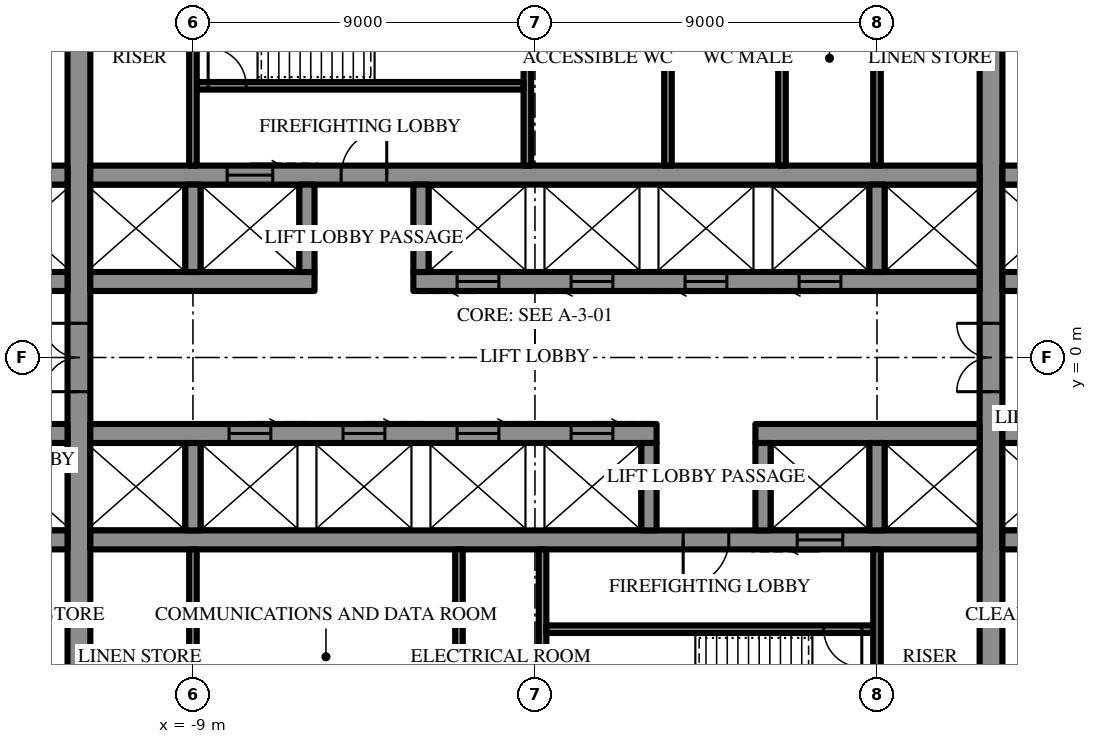
"""IFC4 building model, lengths in metres.
Left out: names, types, materials, properties, quantities, classifications, styles, units other than length and angle.
Written with IfcOpenShell. Run it as: python <this file> out.ifc"""

import sys

from ifc_helpers import new_model, si_unit, direction, frame, frame_2d, origin, place, context, subcontext, project, spatial, rectangle, extrude, element, fill, save


model = new_model("IFC4")
c1 = context("Model", 3, precision=1e-05, world=origin(), true_north=direction((0.0, 1.0)))
c2 = subcontext(c1, "Body", "Model", "MODEL_VIEW")
j1 = project(units=[si_unit("LENGTHUNIT", "METRE"), si_unit("PLANEANGLEUNIT", "RADIAN")], contexts=[c1])
p1 = place(None, origin())
s1 = spatial("IfcSite", under=j1, at=p1, CompositionType="ELEMENT")
p2 = place(p1, origin())
s2 = spatial("IfcBuilding", under=s1, at=p2, CompositionType="ELEMENT")
p3 = place(p2, frame((0.0, 0.0, 86.5)))
s3 = spatial("IfcBuildingStorey", under=s2, at=p3, CompositionType="ELEMENT", Elevation=86.5)
p4 = place(p3, frame((12.0, -10.7, 0.0), z_axis=(0.0, 0.0, 1.0), x_axis=(0.0, 1.0, 0.0)))
e1 = element("IfcWall", 1, at=p4, inside=s3, PredefinedType="SHEAR", context=c2, shape_type="SweptSolid", body=[
    extrude(rectangle(XDim=21.4, YDim=0.6, at=frame_2d((10.7, 0.0))), origin(), (0.0, 0.0, 1.0), 4.2),
])
p5 = place(p4, frame((9.8, 0.0, 0.0)))
e2 = element("IfcOpeningElement", 2, at=p5, cuts=e1, PredefinedType="OPENING", context=c2, shape_type="SweptSolid", body=[
    extrude(rectangle(XDim=1.8, YDim=2.4, at=frame_2d((0.9, 1.2))), frame((0.0, 0.31, 0.0), z_axis=(0.0, -1.0, 0.0), x_axis=(1.0, 0.0, 0.0)), (0.0, 0.0, 1.0), 0.62),
])
p6 = place(p3, frame((-12.0, -10.7, 0.0), z_axis=(0.0, 0.0, 1.0), x_axis=(0.0, 1.0, 0.0)))
e3 = element("IfcWall", 3, at=p6, inside=s3, PredefinedType="SHEAR", context=c2, shape_type="SweptSolid", body=[
    extrude(rectangle(XDim=21.4, YDim=0.6, at=frame_2d((10.7, 0.0))), origin(), (0.0, 0.0, 1.0), 4.2),
])
p7 = place(p6, frame((9.8, 0.0, 0.0)))
e4 = element("IfcOpeningElement", 4, at=p7, cuts=e3, PredefinedType="OPENING", context=c2, shape_type="SweptSolid", body=[
    extrude(rectangle(XDim=1.8, YDim=2.4, at=frame_2d((0.9, 1.2))), frame((0.0, 0.31, 0.0), z_axis=(0.0, -1.0, 0.0), x_axis=(1.0, 0.0, 0.0)), (0.0, 0.0, 1.0), 0.62),
])
p8 = place(p3, frame((-14.8, 2.0, 0.0), z_axis=(0.0, 0.0, 1.0), x_axis=(1.0, 0.0, 0.0)))
e5 = element("IfcWall", 5, at=p8, inside=s3, PredefinedType="SHEAR", context=c2, shape_type="SweptSolid", body=[
    extrude(rectangle(XDim=2.5, YDim=0.5, at=frame_2d((1.25, 0.0))), origin(), (0.0, 0.0, 1.0), 4.2),
])
p9 = place(p3, frame((-11.7, 2.0, 0.0), z_axis=(0.0, 0.0, 1.0), x_axis=(1.0, 0.0, 0.0)))
e6 = element("IfcWall", 6, at=p9, inside=s3, PredefinedType="SHEAR", context=c2, shape_type="SweptSolid", body=[
    extrude(rectangle(XDim=5.9, YDim=0.5, at=frame_2d((2.95, 0.0))), origin(), (0.0, 0.0, 1.0), 4.2),
])
p10 = place(p3, frame((-3.2, 2.0, 0.0), z_axis=(0.0, 0.0, 1.0), x_axis=(1.0, 0.0, 0.0)))
e7 = element("IfcWall", 7, at=p10, inside=s3, PredefinedType="SHEAR", context=c2, shape_type="SweptSolid", body=[
    extrude(rectangle(XDim=14.9, YDim=0.5, at=frame_2d((7.45, 0.0))), origin(), (0.0, 0.0, 1.0), 4.2),
])
p11 = place(p10, frame((1.15, 0.0, 0.0)))
e8 = element("IfcOpeningElement", 8, at=p11, cuts=e7, PredefinedType="OPENING", context=c2, shape_type="SweptSolid", body=[
    extrude(rectangle(XDim=1.1, YDim=2.2, at=frame_2d((0.55, 1.1))), frame((0.0, 0.26, 0.0), z_axis=(0.0, -1.0, 0.0), x_axis=(1.0, 0.0, 0.0)), (0.0, 0.0, 1.0), 0.52),
])
p12 = place(p10, frame((4.15, 0.0, 0.0)))
e9 = element("IfcOpeningElement", 9, at=p12, cuts=e7, PredefinedType="OPENING", context=c2, shape_type="SweptSolid", body=[
    extrude(rectangle(XDim=1.1, YDim=2.2, at=frame_2d((0.55, 1.1))), frame((0.0, 0.26, 0.0), z_axis=(0.0, -1.0, 0.0), x_axis=(1.0, 0.0, 0.0)), (0.0, 0.0, 1.0), 0.52),
])
p13 = place(p10, frame((7.15, 0.0, 0.0)))
e10 = element("IfcOpeningElement", 10, at=p13, cuts=e7, PredefinedType="OPENING", context=c2, shape_type="SweptSolid", body=[
    extrude(rectangle(XDim=1.1, YDim=2.2, at=frame_2d((0.55, 1.1))), frame((0.0, 0.26, 0.0), z_axis=(0.0, -1.0, 0.0), x_axis=(1.0, 0.0, 0.0)), (0.0, 0.0, 1.0), 0.52),
])
p14 = place(p10, frame((10.15, 0.0, 0.0)))
e11 = element("IfcOpeningElement", 11, at=p14, cuts=e7, PredefinedType="OPENING", context=c2, shape_type="SweptSolid", body=[
    extrude(rectangle(XDim=1.1, YDim=2.2, at=frame_2d((0.55, 1.1))), frame((0.0, 0.26, 0.0), z_axis=(0.0, -1.0, 0.0), x_axis=(1.0, 0.0, 0.0)), (0.0, 0.0, 1.0), 0.52),
])
for number, where, z_axis, x_axis in (
    (12, (12.3, 2.0, 0.0), (0.0, 0.0, 1.0), (1.0, 0.0, 0.0)),
    (13, (-14.8, 4.8, 0.0), (0.0, 0.0, 1.0), (1.0, 0.0, 0.0)),
):
    element("IfcWall", number, at=place(p3, frame(where, z_axis=z_axis, x_axis=x_axis)), inside=s3, PredefinedType="SHEAR", context=c2, shape_type="SweptSolid", body=[
        extrude(rectangle(XDim=2.5, YDim=0.5, at=frame_2d((1.25, 0.0))), origin(), (0.0, 0.0, 1.0), 4.2),
    ])
p15 = place(p3, frame((-11.7, 4.8, 0.0), z_axis=(0.0, 0.0, 1.0), x_axis=(1.0, 0.0, 0.0)))
e14 = element("IfcWall", 14, at=p15, inside=s3, PredefinedType="SHEAR", context=c2, shape_type="SweptSolid", body=[
    extrude(rectangle(XDim=23.4, YDim=0.5, at=frame_2d((11.7, 0.0))), origin(), (0.0, 0.0, 1.0), 4.2),
])
p16 = place(p15, frame((6.6, 0.0, 0.0)))
e15 = element("IfcOpeningElement", 15, at=p16, cuts=e14, PredefinedType="OPENING", context=c2, shape_type="SweptSolid", body=[
    extrude(rectangle(XDim=1.2, YDim=2.2, at=frame_2d((0.6, 1.1))), frame((0.0, 0.26, 0.0), z_axis=(0.0, -1.0, 0.0), x_axis=(1.0, 0.0, 0.0)), (0.0, 0.0, 1.0), 0.52),
])
p17 = place(p15, frame((3.6, 0.0, 0.0)))
e16 = element("IfcOpeningElement", 16, at=p17, cuts=e14, PredefinedType="OPENING", context=c2, shape_type="SweptSolid", body=[
    extrude(rectangle(XDim=1.2, YDim=2.2, at=frame_2d((0.6, 1.1))), frame((0.0, 0.26, 0.0), z_axis=(0.0, -1.0, 0.0), x_axis=(1.0, 0.0, 0.0)), (0.0, 0.0, 1.0), 0.52),
])
p18 = place(p3, frame((12.3, 4.8, 0.0), z_axis=(0.0, 0.0, 1.0), x_axis=(1.0, 0.0, 0.0)))
e17 = element("IfcWall", 17, at=p18, inside=s3, PredefinedType="SHEAR", context=c2, shape_type="SweptSolid", body=[
    extrude(rectangle(XDim=2.5, YDim=0.5, at=frame_2d((1.25, 0.0))), origin(), (0.0, 0.0, 1.0), 4.2),
])
for number, where, z_axis, x_axis in (
    (18, (-9.0, 2.25, 0.0), (0.0, 0.0, 1.0), (0.0, 1.0, 0.0)),
    (19, (-6.0, 2.25, 0.0), (0.0, 0.0, 1.0), (0.0, 1.0, 0.0)),
    (20, (-3.0, 2.25, 0.0), (0.0, 0.0, 1.0), (0.0, 1.0, 0.0)),
    (21, (9.0, 2.25, 0.0), (0.0, 0.0, 1.0), (0.0, 1.0, 0.0)),
):
    element("IfcWall", number, at=place(p3, frame(where, z_axis=z_axis, x_axis=x_axis)), inside=s3, PredefinedType="SHEAR", context=c2, shape_type="SweptSolid", body=[
        extrude(rectangle(XDim=2.3, YDim=0.4, at=frame_2d((1.15, 0.0))), origin(), (0.0, 0.0, 1.0), 4.2),
    ])
p19 = place(p3, frame((-0.2, 5.05, 0.0), z_axis=(0.0, 0.0, 1.0), x_axis=(0.0, 1.0, 0.0)))
e22 = element("IfcWall", 22, at=p19, inside=s3, PredefinedType="SHEAR", context=c2, shape_type="SweptSolid", body=[
    extrude(rectangle(XDim=5.65, YDim=0.2, at=frame_2d((2.825, 0.0))), origin(), (0.0, 0.0, 1.0), 4.2),
])
p20 = place(p3, frame((-8.9, 7.15, 0.0), z_axis=(0.0, 0.0, 1.0), x_axis=(1.0, 0.0, 0.0)))
e23 = element("IfcWall", 23, at=p20, inside=s3, PredefinedType="SHEAR", context=c2, shape_type="SweptSolid", body=[
    extrude(rectangle(XDim=8.6, YDim=0.2, at=frame_2d((4.3, 0.0))), origin(), (0.0, 0.0, 1.0), 4.2),
])
p21 = place(p20, frame((0.3, 0.0, 0.0)))
e24 = element("IfcOpeningElement", 24, at=p21, cuts=e23, PredefinedType="OPENING", context=c2, shape_type="SweptSolid", body=[
    extrude(rectangle(XDim=1.0, YDim=2.2, at=frame_2d((0.5, 1.1))), frame((0.0, 0.11, 0.0), z_axis=(0.0, -1.0, 0.0), x_axis=(1.0, 0.0, 0.0)), (0.0, 0.0, 1.0), 0.22),
])
p22 = place(p3, frame((14.8, -2.0, 0.0), z_axis=(0.0, 0.0, 1.0), x_axis=(-1.0, 0.0, 0.0)))
e25 = element("IfcWall", 25, at=p22, inside=s3, PredefinedType="SHEAR", context=c2, shape_type="SweptSolid", body=[
    extrude(rectangle(XDim=2.5, YDim=0.5, at=frame_2d((1.25, 0.0))), origin(), (0.0, 0.0, 1.0), 4.2),
])
p23 = place(p3, frame((11.7, -2.0, 0.0), z_axis=(0.0, 0.0, 1.0), x_axis=(-1.0, 0.0, 0.0)))
e26 = element("IfcWall", 26, at=p23, inside=s3, PredefinedType="SHEAR", context=c2, shape_type="SweptSolid", body=[
    extrude(rectangle(XDim=5.9, YDim=0.5, at=frame_2d((2.95, 0.0))), origin(), (0.0, 0.0, 1.0), 4.2),
])
p24 = place(p3, frame((3.2, -2.0, 0.0), z_axis=(0.0, 0.0, 1.0), x_axis=(-1.0, 0.0, 0.0)))
e27 = element("IfcWall", 27, at=p24, inside=s3, PredefinedType="SHEAR", context=c2, shape_type="SweptSolid", body=[
    extrude(rectangle(XDim=14.9, YDim=0.5, at=frame_2d((7.45, 0.0))), origin(), (0.0, 0.0, 1.0), 4.2),
])
p25 = place(p24, frame((1.15, 0.0, 0.0)))
e28 = element("IfcOpeningElement", 28, at=p25, cuts=e27, PredefinedType="OPENING", context=c2, shape_type="SweptSolid", body=[
    extrude(rectangle(XDim=1.1, YDim=2.2, at=frame_2d((0.55, 1.1))), frame((0.0, 0.26, 0.0), z_axis=(0.0, -1.0, 0.0), x_axis=(1.0, 0.0, 0.0)), (0.0, 0.0, 1.0), 0.52),
])
p26 = place(p24, frame((4.15, 0.0, 0.0)))
e29 = element("IfcOpeningElement", 29, at=p26, cuts=e27, PredefinedType="OPENING", context=c2, shape_type="SweptSolid", body=[
    extrude(rectangle(XDim=1.1, YDim=2.2, at=frame_2d((0.55, 1.1))), frame((0.0, 0.26, 0.0), z_axis=(0.0, -1.0, 0.0), x_axis=(1.0, 0.0, 0.0)), (0.0, 0.0, 1.0), 0.52),
])
p27 = place(p24, frame((7.15, 0.0, 0.0)))
e30 = element("IfcOpeningElement", 30, at=p27, cuts=e27, PredefinedType="OPENING", context=c2, shape_type="SweptSolid", body=[
    extrude(rectangle(XDim=1.1, YDim=2.2, at=frame_2d((0.55, 1.1))), frame((0.0, 0.26, 0.0), z_axis=(0.0, -1.0, 0.0), x_axis=(1.0, 0.0, 0.0)), (0.0, 0.0, 1.0), 0.52),
])
p28 = place(p24, frame((10.15, 0.0, 0.0)))
e31 = element("IfcOpeningElement", 31, at=p28, cuts=e27, PredefinedType="OPENING", context=c2, shape_type="SweptSolid", body=[
    extrude(rectangle(XDim=1.1, YDim=2.2, at=frame_2d((0.55, 1.1))), frame((0.0, 0.26, 0.0), z_axis=(0.0, -1.0, 0.0), x_axis=(1.0, 0.0, 0.0)), (0.0, 0.0, 1.0), 0.52),
])
for number, where, z_axis, x_axis in (
    (32, (-12.3, -2.0, 0.0), (0.0, 0.0, 1.0), (-1.0, 0.0, 0.0)),
    (33, (14.8, -4.8, 0.0), (0.0, 0.0, 1.0), (-1.0, 0.0, 0.0)),
):
    element("IfcWall", number, at=place(p3, frame(where, z_axis=z_axis, x_axis=x_axis)), inside=s3, PredefinedType="SHEAR", context=c2, shape_type="SweptSolid", body=[
        extrude(rectangle(XDim=2.5, YDim=0.5, at=frame_2d((1.25, 0.0))), origin(), (0.0, 0.0, 1.0), 4.2),
    ])
p29 = place(p3, frame((11.7, -4.8, 0.0), z_axis=(0.0, 0.0, 1.0), x_axis=(-1.0, 0.0, 0.0)))
e34 = element("IfcWall", 34, at=p29, inside=s3, PredefinedType="SHEAR", context=c2, shape_type="SweptSolid", body=[
    extrude(rectangle(XDim=23.4, YDim=0.5, at=frame_2d((11.7, 0.0))), origin(), (0.0, 0.0, 1.0), 4.2),
])
p30 = place(p29, frame((6.6, 0.0, 0.0)))
e35 = element("IfcOpeningElement", 35, at=p30, cuts=e34, PredefinedType="OPENING", context=c2, shape_type="SweptSolid", body=[
    extrude(rectangle(XDim=1.2, YDim=2.2, at=frame_2d((0.6, 1.1))), frame((0.0, 0.26, 0.0), z_axis=(0.0, -1.0, 0.0), x_axis=(1.0, 0.0, 0.0)), (0.0, 0.0, 1.0), 0.52),
])
p31 = place(p29, frame((3.6, 0.0, 0.0)))
e36 = element("IfcOpeningElement", 36, at=p31, cuts=e34, PredefinedType="OPENING", context=c2, shape_type="SweptSolid", body=[
    extrude(rectangle(XDim=1.2, YDim=2.2, at=frame_2d((0.6, 1.1))), frame((0.0, 0.26, 0.0), z_axis=(0.0, -1.0, 0.0), x_axis=(1.0, 0.0, 0.0)), (0.0, 0.0, 1.0), 0.52),
])
p32 = place(p3, frame((-12.3, -4.8, 0.0), z_axis=(0.0, 0.0, 1.0), x_axis=(-1.0, 0.0, 0.0)))
e37 = element("IfcWall", 37, at=p32, inside=s3, PredefinedType="SHEAR", context=c2, shape_type="SweptSolid", body=[
    extrude(rectangle(XDim=2.5, YDim=0.5, at=frame_2d((1.25, 0.0))), origin(), (0.0, 0.0, 1.0), 4.2),
])
for number, where, z_axis, x_axis in (
    (38, (9.0, -2.25, 0.0), (0.0, 0.0, 1.0), (0.0, -1.0, 0.0)),
    (39, (6.0, -2.25, 0.0), (0.0, 0.0, 1.0), (0.0, -1.0, 0.0)),
    (40, (3.0, -2.25, 0.0), (0.0, 0.0, 1.0), (0.0, -1.0, 0.0)),
    (41, (-9.0, -2.25, 0.0), (0.0, 0.0, 1.0), (0.0, -1.0, 0.0)),
):
    element("IfcWall", number, at=place(p3, frame(where, z_axis=z_axis, x_axis=x_axis)), inside=s3, PredefinedType="SHEAR", context=c2, shape_type="SweptSolid", body=[
        extrude(rectangle(XDim=2.3, YDim=0.4, at=frame_2d((1.15, 0.0))), origin(), (0.0, 0.0, 1.0), 4.2),
    ])
p33 = place(p3, frame((0.2, -5.05, 0.0), z_axis=(0.0, 0.0, 1.0), x_axis=(0.0, -1.0, 0.0)))
e42 = element("IfcWall", 42, at=p33, inside=s3, PredefinedType="SHEAR", context=c2, shape_type="SweptSolid", body=[
    extrude(rectangle(XDim=5.65, YDim=0.2, at=frame_2d((2.825, 0.0))), origin(), (0.0, 0.0, 1.0), 4.2),
])
p34 = place(p3, frame((8.9, -7.15, 0.0), z_axis=(0.0, 0.0, 1.0), x_axis=(-1.0, 0.0, 0.0)))
e43 = element("IfcWall", 43, at=p34, inside=s3, PredefinedType="SHEAR", context=c2, shape_type="SweptSolid", body=[
    extrude(rectangle(XDim=8.6, YDim=0.2, at=frame_2d((4.3, 0.0))), origin(), (0.0, 0.0, 1.0), 4.2),
])
p35 = place(p34, frame((0.3, 0.0, 0.0)))
e44 = element("IfcOpeningElement", 44, at=p35, cuts=e43, PredefinedType="OPENING", context=c2, shape_type="SweptSolid", body=[
    extrude(rectangle(XDim=1.0, YDim=2.2, at=frame_2d((0.5, 1.1))), frame((0.0, 0.11, 0.0), z_axis=(0.0, -1.0, 0.0), x_axis=(1.0, 0.0, 0.0)), (0.0, 0.0, 1.0), 0.22),
])
for number, where, z_axis, x_axis in (
    (45, (-9.0, 5.05, 0.0), (0.0, 0.0, 1.0), (0.0, 1.0, 0.0)),
    (46, (9.0, 5.05, 0.0), (0.0, 0.0, 1.0), (0.0, 1.0, 0.0)),
    (47, (3.5, 5.05, 0.0), (0.0, 0.0, 1.0), (0.0, 1.0, 0.0)),
    (48, (6.5, 5.05, 0.0), (0.0, 0.0, 1.0), (0.0, 1.0, 0.0)),
    (49, (9.0, -5.05, 0.0), (0.0, 0.0, 1.0), (0.0, -1.0, 0.0)),
    (50, (-9.0, -5.05, 0.0), (0.0, 0.0, 1.0), (0.0, -1.0, 0.0)),
    (51, (-2.0, -5.05, 0.0), (0.0, 0.0, 1.0), (0.0, -1.0, 0.0)),
):
    element("IfcWall", number, at=place(p3, frame(where, z_axis=z_axis, x_axis=x_axis)), inside=s3, PredefinedType="PARTITIONING", context=c2, shape_type="SweptSolid", body=[
        extrude(rectangle(XDim=5.65, YDim=0.2, at=frame_2d((2.825, 0.0))), origin(), (0.0, 0.0, 1.0), 4.0),
    ])
p36 = place(p16, origin())
e52 = element("IfcDoor", 52, at=p36, inside=s3, OperationType="SINGLE_SWING_LEFT", PredefinedType="DOOR", context=c2, shape_type="SweptSolid", body=[
    extrude(rectangle(XDim=1.2, YDim=2.2, at=frame_2d((0.6, 1.1))), frame((0.0, 0.025, 0.0), z_axis=(0.0, -1.0, 0.0), x_axis=(1.0, 0.0, 0.0)), (0.0, 0.0, 1.0), 0.05),
])
fill(e15, e52)
p37 = place(p21, origin())
e53 = element("IfcDoor", 53, at=p37, inside=s3, OperationType="SINGLE_SWING_RIGHT", PredefinedType="DOOR", context=c2, shape_type="SweptSolid", body=[
    extrude(rectangle(XDim=1.0, YDim=2.2, at=frame_2d((0.5, 1.1))), frame((0.0, 0.025, 0.0), z_axis=(0.0, -1.0, 0.0), x_axis=(1.0, 0.0, 0.0)), (0.0, 0.0, 1.0), 0.05),
])
fill(e24, e53)
p38 = place(p30, origin())
e54 = element("IfcDoor", 54, at=p38, inside=s3, OperationType="SINGLE_SWING_LEFT", PredefinedType="DOOR", context=c2, shape_type="SweptSolid", body=[
    extrude(rectangle(XDim=1.2, YDim=2.2, at=frame_2d((0.6, 1.1))), frame((0.0, 0.025, 0.0), z_axis=(0.0, -1.0, 0.0), x_axis=(1.0, 0.0, 0.0)), (0.0, 0.0, 1.0), 0.05),
])
fill(e35, e54)
p39 = place(p35, origin())
e55 = element("IfcDoor", 55, at=p39, inside=s3, OperationType="SINGLE_SWING_RIGHT", PredefinedType="DOOR", context=c2, shape_type="SweptSolid", body=[
    extrude(rectangle(XDim=1.0, YDim=2.2, at=frame_2d((0.5, 1.1))), frame((0.0, 0.025, 0.0), z_axis=(0.0, -1.0, 0.0), x_axis=(1.0, 0.0, 0.0)), (0.0, 0.0, 1.0), 0.05),
])
fill(e44, e55)
p40 = place(p5, origin())
e56 = element("IfcDoor", 56, at=p40, inside=s3, OperationType="DOUBLE_DOOR_SINGLE_SWING", PredefinedType="DOOR", context=c2, shape_type="SweptSolid", body=[
    extrude(rectangle(XDim=1.8, YDim=2.4, at=frame_2d((0.9, 1.2))), frame((0.0, 0.025, 0.0), z_axis=(0.0, -1.0, 0.0), x_axis=(1.0, 0.0, 0.0)), (0.0, 0.0, 1.0), 0.05),
])
fill(e2, e56)
p41 = place(p7, origin())
e57 = element("IfcDoor", 57, at=p41, inside=s3, OperationType="DOUBLE_DOOR_SINGLE_SWING", PredefinedType="DOOR", context=c2, shape_type="SweptSolid", body=[
    extrude(rectangle(XDim=1.8, YDim=2.4, at=frame_2d((0.9, 1.2))), frame((0.0, 0.025, 0.0), z_axis=(0.0, -1.0, 0.0), x_axis=(1.0, 0.0, 0.0)), (0.0, 0.0, 1.0), 0.05),
])
fill(e4, e57)
p42 = place(p17, origin())
e58 = element("IfcDoor", 58, at=p42, inside=s3, OperationType="SLIDING_TO_LEFT", PredefinedType="DOOR", context=c2, shape_type="SweptSolid", body=[
    extrude(rectangle(XDim=1.2, YDim=2.2, at=frame_2d((0.6, 1.1))), frame((0.0, 0.025, 0.0), z_axis=(0.0, -1.0, 0.0), x_axis=(1.0, 0.0, 0.0)), (0.0, 0.0, 1.0), 0.05),
])
fill(e16, e58)
p43 = place(p11, frame((1.1, 0.0, 0.0), z_axis=(0.0, 0.0, 1.0), x_axis=(-1.0, 0.0, 0.0)))
e59 = element("IfcDoor", 59, at=p43, inside=s3, OperationType="SLIDING_TO_LEFT", PredefinedType="DOOR", context=c2, shape_type="SweptSolid", body=[
    extrude(rectangle(XDim=1.1, YDim=2.2, at=frame_2d((0.55, 1.1))), frame((0.0, 0.025, 0.0), z_axis=(0.0, -1.0, 0.0), x_axis=(1.0, 0.0, 0.0)), (0.0, 0.0, 1.0), 0.05),
])
fill(e8, e59)
p44 = place(p12, frame((1.1, 0.0, 0.0), z_axis=(0.0, 0.0, 1.0), x_axis=(-1.0, 0.0, 0.0)))
e60 = element("IfcDoor", 60, at=p44, inside=s3, OperationType="SLIDING_TO_LEFT", PredefinedType="DOOR", context=c2, shape_type="SweptSolid", body=[
    extrude(rectangle(XDim=1.1, YDim=2.2, at=frame_2d((0.55, 1.1))), frame((0.0, 0.025, 0.0), z_axis=(0.0, -1.0, 0.0), x_axis=(1.0, 0.0, 0.0)), (0.0, 0.0, 1.0), 0.05),
])
fill(e9, e60)
p45 = place(p13, frame((1.1, 0.0, 0.0), z_axis=(0.0, 0.0, 1.0), x_axis=(-1.0, 0.0, 0.0)))
e61 = element("IfcDoor", 61, at=p45, inside=s3, OperationType="SLIDING_TO_LEFT", PredefinedType="DOOR", context=c2, shape_type="SweptSolid", body=[
    extrude(rectangle(XDim=1.1, YDim=2.2, at=frame_2d((0.55, 1.1))), frame((0.0, 0.025, 0.0), z_axis=(0.0, -1.0, 0.0), x_axis=(1.0, 0.0, 0.0)), (0.0, 0.0, 1.0), 0.05),
])
fill(e10, e61)
p46 = place(p14, frame((1.1, 0.0, 0.0), z_axis=(0.0, 0.0, 1.0), x_axis=(-1.0, 0.0, 0.0)))
e62 = element("IfcDoor", 62, at=p46, inside=s3, OperationType="SLIDING_TO_LEFT", PredefinedType="DOOR", context=c2, shape_type="SweptSolid", body=[
    extrude(rectangle(XDim=1.1, YDim=2.2, at=frame_2d((0.55, 1.1))), frame((0.0, 0.025, 0.0), z_axis=(0.0, -1.0, 0.0), x_axis=(1.0, 0.0, 0.0)), (0.0, 0.0, 1.0), 0.05),
])
fill(e11, e62)
p47 = place(p31, origin())
e63 = element("IfcDoor", 63, at=p47, inside=s3, OperationType="SLIDING_TO_LEFT", PredefinedType="DOOR", context=c2, shape_type="SweptSolid", body=[
    extrude(rectangle(XDim=1.2, YDim=2.2, at=frame_2d((0.6, 1.1))), frame((0.0, 0.025, 0.0), z_axis=(0.0, -1.0, 0.0), x_axis=(1.0, 0.0, 0.0)), (0.0, 0.0, 1.0), 0.05),
])
fill(e36, e63)
p48 = place(p25, frame((1.1, 0.0, 0.0), z_axis=(0.0, 0.0, 1.0), x_axis=(-1.0, 0.0, 0.0)))
e64 = element("IfcDoor", 64, at=p48, inside=s3, OperationType="SLIDING_TO_LEFT", PredefinedType="DOOR", context=c2, shape_type="SweptSolid", body=[
    extrude(rectangle(XDim=1.1, YDim=2.2, at=frame_2d((0.55, 1.1))), frame((0.0, 0.025, 0.0), z_axis=(0.0, -1.0, 0.0), x_axis=(1.0, 0.0, 0.0)), (0.0, 0.0, 1.0), 0.05),
])
fill(e28, e64)
p49 = place(p26, frame((1.1, 0.0, 0.0), z_axis=(0.0, 0.0, 1.0), x_axis=(-1.0, 0.0, 0.0)))
e65 = element("IfcDoor", 65, at=p49, inside=s3, OperationType="SLIDING_TO_LEFT", PredefinedType="DOOR", context=c2, shape_type="SweptSolid", body=[
    extrude(rectangle(XDim=1.1, YDim=2.2, at=frame_2d((0.55, 1.1))), frame((0.0, 0.025, 0.0), z_axis=(0.0, -1.0, 0.0), x_axis=(1.0, 0.0, 0.0)), (0.0, 0.0, 1.0), 0.05),
])
fill(e29, e65)
p50 = place(p27, frame((1.1, 0.0, 0.0), z_axis=(0.0, 0.0, 1.0), x_axis=(-1.0, 0.0, 0.0)))
e66 = element("IfcDoor", 66, at=p50, inside=s3, OperationType="SLIDING_TO_LEFT", PredefinedType="DOOR", context=c2, shape_type="SweptSolid", body=[
    extrude(rectangle(XDim=1.1, YDim=2.2, at=frame_2d((0.55, 1.1))), frame((0.0, 0.025, 0.0), z_axis=(0.0, -1.0, 0.0), x_axis=(1.0, 0.0, 0.0)), (0.0, 0.0, 1.0), 0.05),
])
fill(e30, e66)
p51 = place(p28, frame((1.1, 0.0, 0.0), z_axis=(0.0, 0.0, 1.0), x_axis=(-1.0, 0.0, 0.0)))
e67 = element("IfcDoor", 67, at=p51, inside=s3, OperationType="SLIDING_TO_LEFT", PredefinedType="DOOR", context=c2, shape_type="SweptSolid", body=[
    extrude(rectangle(XDim=1.1, YDim=2.2, at=frame_2d((0.55, 1.1))), frame((0.0, 0.025, 0.0), z_axis=(0.0, -1.0, 0.0), x_axis=(1.0, 0.0, 0.0)), (0.0, 0.0, 1.0), 0.05),
])
fill(e31, e67)
save(model, sys.argv[1])
